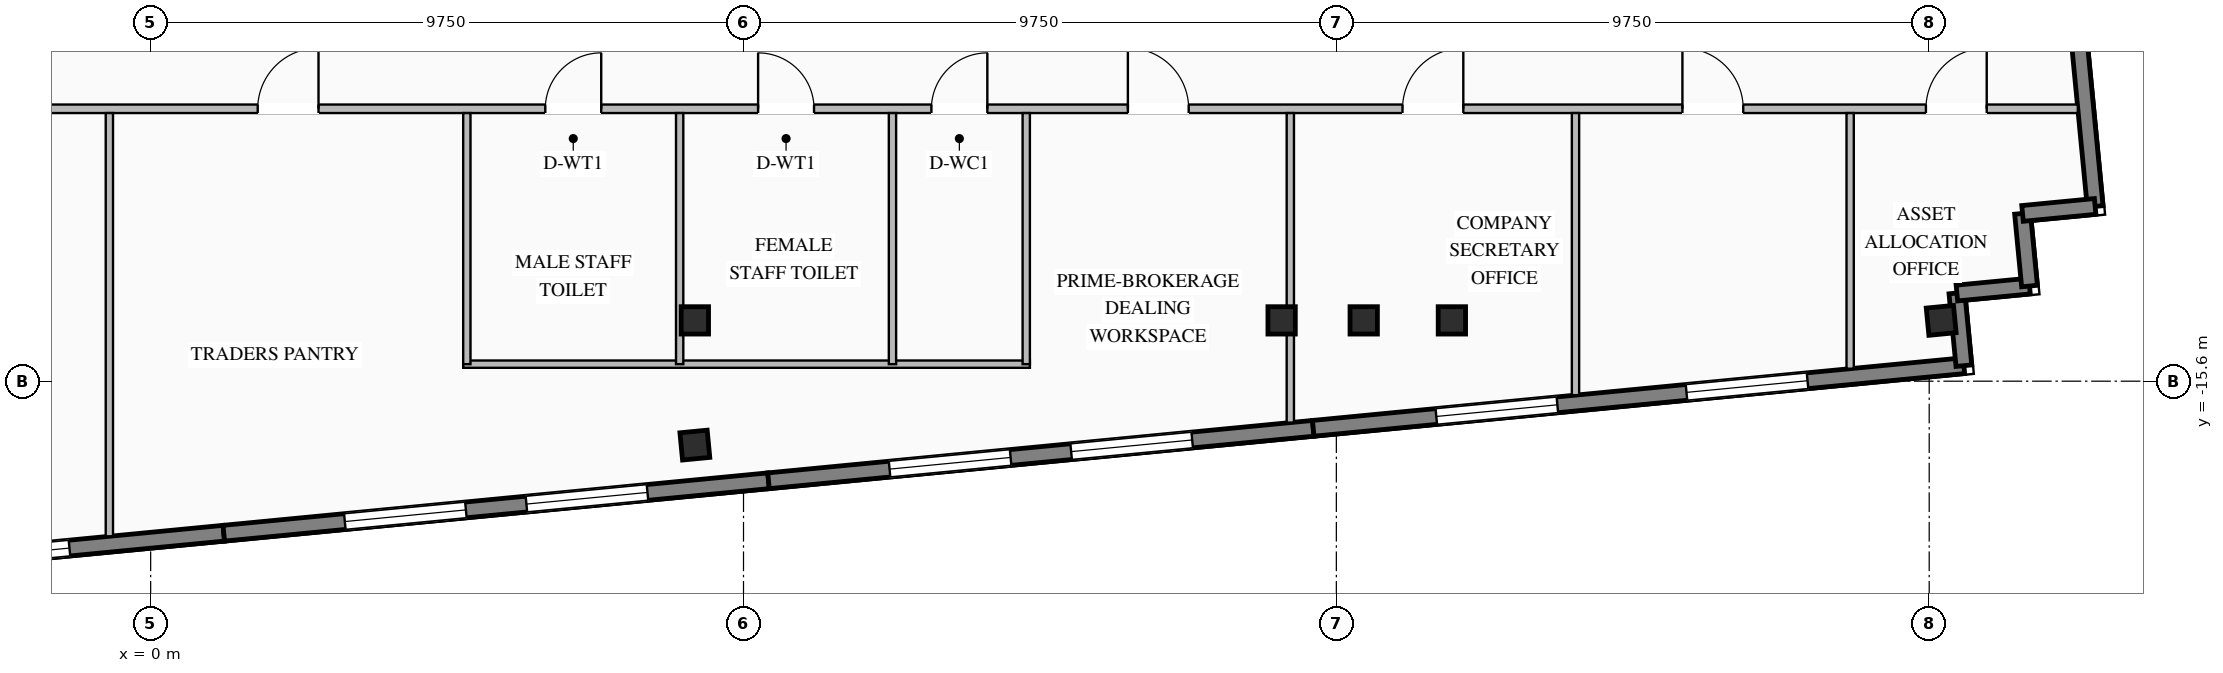
"""IFC4 building model, lengths in metres.
Left out: names, types, materials, properties, quantities, classifications, styles, units other than length and angle.
Written with IfcOpenShell. Run it as: python <this file> out.ifc"""

import sys

from ifc_helpers import new_model, si_unit, direction, frame, frame_2d, origin, origin_2d, place, context, subcontext, project, spatial, rectangle, i_section, extrude, element, fill, save


model = new_model("IFC4")
c1 = context("Model", 3, precision=1e-05, world=origin(), true_north=direction((0.0, 1.0)))
c2 = subcontext(c1, "Body", "Model", "MODEL_VIEW")
j1 = project(units=[si_unit("LENGTHUNIT", "METRE"), si_unit("PLANEANGLEUNIT", "RADIAN")], contexts=[c1])
p1 = place(None, origin())
s1 = spatial("IfcSite", under=j1, at=p1, CompositionType="ELEMENT")
p2 = place(p1, origin())
s2 = spatial("IfcBuilding", under=s1, at=p2, CompositionType="ELEMENT")
p3 = place(p2, frame((0.0, 0.0, 262.05)))
s3 = spatial("IfcBuildingStorey", under=s2, at=p3, CompositionType="ELEMENT", Elevation=262.05)
for number, where, z_axis, x_axis in (
    (1, (8.95, -14.6, 0.0), (0.0, 0.0, 1.0), (1.0, 0.0, 0.0)),
    (2, (18.6, -14.6, 0.0), (0.0, 0.0, 1.0), (1.0, 0.0, 0.0)),
    (3, (19.95, -14.6, 0.0), (0.0, 0.0, 1.0), (1.0, 0.0, 0.0)),
    (4, (21.4, -14.6, 0.0), (0.0, 0.0, 1.0), (1.0, 0.0, 0.0)),
    (5, (8.95, -16.651, 0.0), (0.0, 0.0, 1.0), (0.995, 0.096, 0.0)),
    (6, (29.447, -14.6, 0.0), (0.0, 0.0, 1.0), (0.995, 0.096, 0.0)),
):
    element("IfcColumn", number, at=place(p3, frame(where, z_axis=z_axis, x_axis=x_axis)), inside=s3, PredefinedType="COLUMN", context=c2, shape_type="SweptSolid", body=[
        extrude(i_section(OverallWidth=0.45, OverallDepth=0.45, WebThickness=0.022, FlangeThickness=0.032, at=origin_2d()), origin(), (0.0, 0.0, 1.0), 3.45),
    ])
p4 = place(p3, frame((1.203, -18.101, 0.0), z_axis=(0.0, 0.0, 1.0), x_axis=(-0.995397043619, -0.095836973841, 0.0)))
e7 = element("IfcWall", 7, at=p4, inside=s3, PredefinedType="STANDARD", context=c2, shape_type="SweptSolid", body=[
    extrude(rectangle(XDim=9.0, YDim=0.26, at=frame_2d((4.5, 0.0))), origin(), (0.0, 0.0, 1.0), 3.25),
])
p5 = place(p4, frame((2.55, 0.0, 0.76)))
e8 = element("IfcOpeningElement", 8, at=p5, cuts=e7, PredefinedType="OPENING", context=c2, shape_type="SweptSolid", body=[
    extrude(rectangle(XDim=2.0, YDim=2.05, at=frame_2d((1.0, 1.025))), frame((0.0, 0.14, 0.0), z_axis=(0.0, -1.0, 0.0), x_axis=(1.0, 0.0, 0.0)), (0.0, 0.0, 1.0), 0.28),
])
p6 = place(p4, frame((5.0, 0.0, 0.76)))
e9 = element("IfcOpeningElement", 9, at=p6, cuts=e7, PredefinedType="OPENING", context=c2, shape_type="SweptSolid", body=[
    extrude(rectangle(XDim=2.0, YDim=2.05, at=frame_2d((1.0, 1.025))), frame((0.0, 0.14, 0.0), z_axis=(0.0, -1.0, 0.0), x_axis=(1.0, 0.0, 0.0)), (0.0, 0.0, 1.0), 0.28),
])
p7 = place(p3, frame((10.161, -17.238, 0.0), z_axis=(0.0, 0.0, 1.0), x_axis=(-0.995394206237, -0.095866439332, 0.0)))
e10 = element("IfcWall", 10, at=p7, inside=s3, PredefinedType="STANDARD", context=c2, shape_type="SweptSolid", body=[
    extrude(rectangle(XDim=9.0, YDim=0.26, at=frame_2d((4.5, 0.0))), origin(), (0.0, 0.0, 1.0), 3.25),
])
p8 = place(p7, frame((2.0, 0.0, 0.76)))
e11 = element("IfcOpeningElement", 11, at=p8, cuts=e10, PredefinedType="OPENING", context=c2, shape_type="SweptSolid", body=[
    extrude(rectangle(XDim=2.0, YDim=2.05, at=frame_2d((1.0, 1.025))), frame((0.0, 0.14, 0.0), z_axis=(0.0, -1.0, 0.0), x_axis=(1.0, 0.0, 0.0)), (0.0, 0.0, 1.0), 0.28),
])
p9 = place(p7, frame((5.0, 0.0, 0.76)))
e12 = element("IfcOpeningElement", 12, at=p9, cuts=e10, PredefinedType="OPENING", context=c2, shape_type="SweptSolid", body=[
    extrude(rectangle(XDim=2.0, YDim=2.05, at=frame_2d((1.0, 1.025))), frame((0.0, 0.14, 0.0), z_axis=(0.0, -1.0, 0.0), x_axis=(1.0, 0.0, 0.0)), (0.0, 0.0, 1.0), 0.28),
])
p10 = place(p3, frame((19.12, -16.375, 0.0), z_axis=(0.0, 0.0, 1.0), x_axis=(-0.995396794462, -0.09583956164, 0.0)))
e13 = element("IfcWall", 13, at=p10, inside=s3, PredefinedType="STANDARD", context=c2, shape_type="SweptSolid", body=[
    extrude(rectangle(XDim=9.0, YDim=0.26, at=frame_2d((4.5, 0.0))), origin(), (0.0, 0.0, 1.0), 3.25),
])
p11 = place(p10, frame((2.0, 0.0, 0.76)))
e14 = element("IfcOpeningElement", 14, at=p11, cuts=e13, PredefinedType="OPENING", context=c2, shape_type="SweptSolid", body=[
    extrude(rectangle(XDim=2.0, YDim=2.05, at=frame_2d((1.0, 1.025))), frame((0.0, 0.14, 0.0), z_axis=(0.0, -1.0, 0.0), x_axis=(1.0, 0.0, 0.0)), (0.0, 0.0, 1.0), 0.28),
])
p12 = place(p10, frame((5.0, 0.0, 0.76)))
e15 = element("IfcOpeningElement", 15, at=p12, cuts=e13, PredefinedType="OPENING", context=c2, shape_type="SweptSolid", body=[
    extrude(rectangle(XDim=2.0, YDim=2.05, at=frame_2d((1.0, 1.025))), frame((0.0, 0.14, 0.0), z_axis=(0.0, -1.0, 0.0), x_axis=(1.0, 0.0, 0.0)), (0.0, 0.0, 1.0), 0.28),
])
p13 = place(p3, frame((29.821, -15.345, 0.0), z_axis=(0.0, 0.0, 1.0), x_axis=(-0.995396954468, -0.095837899791, 0.0)))
e16 = element("IfcWall", 16, at=p13, inside=s3, PredefinedType="STANDARD", context=c2, shape_type="SweptSolid", body=[
    extrude(rectangle(XDim=10.75, YDim=0.26, at=frame_2d((5.375, 0.0))), origin(), (0.0, 0.0, 1.0), 3.25),
])
p14 = place(p13, frame((2.583, 0.0, 0.76)))
e17 = element("IfcOpeningElement", 17, at=p14, cuts=e16, PredefinedType="OPENING", context=c2, shape_type="SweptSolid", body=[
    extrude(rectangle(XDim=2.0, YDim=2.05, at=frame_2d((1.0, 1.025))), frame((0.0, 0.14, 0.0), z_axis=(0.0, -1.0, 0.0), x_axis=(1.0, 0.0, 0.0)), (0.0, 0.0, 1.0), 0.28),
])
p15 = place(p13, frame((6.717, 0.0, 0.76)))
e18 = element("IfcOpeningElement", 18, at=p15, cuts=e16, PredefinedType="OPENING", context=c2, shape_type="SweptSolid", body=[
    extrude(rectangle(XDim=2.0, YDim=2.05, at=frame_2d((1.0, 1.025))), frame((0.0, 0.14, 0.0), z_axis=(0.0, -1.0, 0.0), x_axis=(1.0, 0.0, 0.0)), (0.0, 0.0, 1.0), 0.28),
])
p16 = place(p3, frame((30.527, 2.354, 0.0), z_axis=(0.0, 0.0, 1.0), x_axis=(0.095850890337, -0.995395703638, 0.0)))
e19 = element("IfcWall", 19, at=p16, inside=s3, PredefinedType="STANDARD", context=c2, shape_type="SweptSolid", body=[
    extrude(rectangle(XDim=15.15, YDim=0.26, at=frame_2d((7.575, 0.0))), origin(), (0.0, 0.0, 1.0), 3.25),
])
p17 = place(p16, frame((4.35, 0.0, 0.76)))
e20 = element("IfcOpeningElement", 20, at=p17, cuts=e19, PredefinedType="OPENING", context=c2, shape_type="SweptSolid", body=[
    extrude(rectangle(XDim=1.4, YDim=1.95, at=frame_2d((0.7, 0.975))), frame((0.0, 0.14, 0.0), z_axis=(0.0, -1.0, 0.0), x_axis=(1.0, 0.0, 0.0)), (0.0, 0.0, 1.0), 0.28),
])
p18 = place(p16, frame((9.4, 0.0, 0.76)))
e21 = element("IfcOpeningElement", 21, at=p18, cuts=e19, PredefinedType="OPENING", context=c2, shape_type="SweptSolid", body=[
    extrude(rectangle(XDim=1.4, YDim=1.95, at=frame_2d((0.7, 0.975))), frame((0.0, 0.14, 0.0), z_axis=(0.0, -1.0, 0.0), x_axis=(1.0, 0.0, 0.0)), (0.0, 0.0, 1.0), 0.28),
])
for number, where, z_axis, x_axis in (
    (22, (29.821, -15.345, 0.0), (0.0, 0.0, 1.0), (-0.096, 0.995, 0.0)),
    (23, (29.705, -14.15, 0.0), (0.0, 0.0, 1.0), (0.995, 0.096, 0.0)),
):
    element("IfcWall", number, at=place(p3, frame(where, z_axis=z_axis, x_axis=x_axis)), inside=s3, PredefinedType="STANDARD", context=c2, shape_type="SweptSolid", body=[
        extrude(rectangle(XDim=1.2, YDim=0.26, at=frame_2d((0.6, 0.0))), origin(), (0.0, 0.0, 1.0), 2.565),
    ])
p19 = place(p3, frame((30.9, -14.035, 0.0), z_axis=(0.0, 0.0, 1.0), x_axis=(-0.095836473879, 0.995397091755, 0.0)))
e24 = element("IfcWall", 24, at=p19, inside=s3, PredefinedType="STANDARD", context=c2, shape_type="SweptSolid", body=[
    extrude(rectangle(XDim=1.2, YDim=0.26, at=frame_2d((0.6, 0.0))), origin(), (0.0, 0.0, 1.0), 2.565),
])
p20 = place(p3, frame((30.785, -12.841, 0.0), z_axis=(0.0, 0.0, 1.0), x_axis=(0.995398960025, 0.095817067274, 0.0)))
e25 = element("IfcWall", 25, at=p20, inside=s3, PredefinedType="STANDARD", context=c2, shape_type="SweptSolid", body=[
    extrude(rectangle(XDim=1.2, YDim=0.26, at=frame_2d((0.6, 0.0))), origin(), (0.0, 0.0, 1.0), 2.565),
])
p21 = place(p3, frame((-21.591, -11.12, 0.0), z_axis=(0.0, 0.0, 1.0), x_axis=(1.0, 0.0, 0.0)))
e26 = element("IfcWall", 26, at=p21, inside=s3, PredefinedType="STANDARD", context=c2, shape_type="SweptSolid", body=[
    extrude(rectangle(XDim=53.285, YDim=0.14, at=frame_2d((26.643, 0.0))), origin(), (0.0, 0.0, 1.0), 3.25),
])
p22 = place(p21, frame((28.081, 0.0, 0.0)))
e27 = element("IfcOpeningElement", 27, at=p22, cuts=e26, PredefinedType="OPENING", context=c2, shape_type="SweptSolid", body=[
    extrude(rectangle(XDim=0.92, YDim=2.08, at=frame_2d((0.46, 1.04))), frame((0.0, 0.08, 0.0), z_axis=(0.0, -1.0, 0.0), x_axis=(1.0, 0.0, 0.0)), (0.0, 0.0, 1.0), 0.16),
])
p23 = place(p21, frame((31.581, 0.0, 0.0)))
e28 = element("IfcOpeningElement", 28, at=p23, cuts=e26, PredefinedType="OPENING", context=c2, shape_type="SweptSolid", body=[
    extrude(rectangle(XDim=0.92, YDim=2.08, at=frame_2d((0.46, 1.04))), frame((0.0, 0.08, 0.0), z_axis=(0.0, -1.0, 0.0), x_axis=(1.0, 0.0, 0.0)), (0.0, 0.0, 1.0), 0.16),
])
p24 = place(p21, frame((34.431, 0.0, 0.0)))
e29 = element("IfcOpeningElement", 29, at=p24, cuts=e26, PredefinedType="OPENING", context=c2, shape_type="SweptSolid", body=[
    extrude(rectangle(XDim=0.92, YDim=2.08, at=frame_2d((0.46, 1.04))), frame((0.0, 0.08, 0.0), z_axis=(0.0, -1.0, 0.0), x_axis=(1.0, 0.0, 0.0)), (0.0, 0.0, 1.0), 0.16),
])
p25 = place(p21, frame((3.0, 0.0, 0.0)))
e30 = element("IfcOpeningElement", 30, at=p25, cuts=e26, PredefinedType="OPENING", context=c2, shape_type="SweptSolid", body=[
    extrude(rectangle(XDim=1.0, YDim=2.08, at=frame_2d((0.5, 1.04))), frame((0.0, 0.08, 0.0), z_axis=(0.0, -1.0, 0.0), x_axis=(1.0, 0.0, 0.0)), (0.0, 0.0, 1.0), 0.16),
])
p26 = place(p21, frame((9.856, 0.0, 0.0)))
e31 = element("IfcOpeningElement", 31, at=p26, cuts=e26, PredefinedType="OPENING", context=c2, shape_type="SweptSolid", body=[
    extrude(rectangle(XDim=1.0, YDim=2.08, at=frame_2d((0.5, 1.04))), frame((0.0, 0.08, 0.0), z_axis=(0.0, -1.0, 0.0), x_axis=(1.0, 0.0, 0.0)), (0.0, 0.0, 1.0), 0.16),
])
p27 = place(p21, frame((16.938, 0.0, 0.0)))
e32 = element("IfcOpeningElement", 32, at=p27, cuts=e26, PredefinedType="OPENING", context=c2, shape_type="SweptSolid", body=[
    extrude(rectangle(XDim=1.0, YDim=2.08, at=frame_2d((0.5, 1.04))), frame((0.0, 0.08, 0.0), z_axis=(0.0, -1.0, 0.0), x_axis=(1.0, 0.0, 0.0)), (0.0, 0.0, 1.0), 0.16),
])
p28 = place(p21, frame((23.352, 0.0, 0.0)))
e33 = element("IfcOpeningElement", 33, at=p28, cuts=e26, PredefinedType="OPENING", context=c2, shape_type="SweptSolid", body=[
    extrude(rectangle(XDim=1.0, YDim=2.08, at=frame_2d((0.5, 1.04))), frame((0.0, 0.08, 0.0), z_axis=(0.0, -1.0, 0.0), x_axis=(1.0, 0.0, 0.0)), (0.0, 0.0, 1.0), 0.16),
])
p29 = place(p21, frame((37.663, 0.0, 0.0)))
e34 = element("IfcOpeningElement", 34, at=p29, cuts=e26, PredefinedType="OPENING", context=c2, shape_type="SweptSolid", body=[
    extrude(rectangle(XDim=1.0, YDim=2.08, at=frame_2d((0.5, 1.04))), frame((0.0, 0.08, 0.0), z_axis=(0.0, -1.0, 0.0), x_axis=(1.0, 0.0, 0.0)), (0.0, 0.0, 1.0), 0.16),
])
p30 = place(p21, frame((42.179, 0.0, 0.0)))
e35 = element("IfcOpeningElement", 35, at=p30, cuts=e26, PredefinedType="OPENING", context=c2, shape_type="SweptSolid", body=[
    extrude(rectangle(XDim=1.0, YDim=2.08, at=frame_2d((0.5, 1.04))), frame((0.0, 0.08, 0.0), z_axis=(0.0, -1.0, 0.0), x_axis=(1.0, 0.0, 0.0)), (0.0, 0.0, 1.0), 0.16),
])
p31 = place(p21, frame((46.783, 0.0, 0.0)))
e36 = element("IfcOpeningElement", 36, at=p31, cuts=e26, PredefinedType="OPENING", context=c2, shape_type="SweptSolid", body=[
    extrude(rectangle(XDim=1.0, YDim=2.08, at=frame_2d((0.5, 1.04))), frame((0.0, 0.08, 0.0), z_axis=(0.0, -1.0, 0.0), x_axis=(1.0, 0.0, 0.0)), (0.0, 0.0, 1.0), 0.16),
])
p32 = place(p21, frame((50.787, 0.0, 0.0)))
e37 = element("IfcOpeningElement", 37, at=p32, cuts=e26, PredefinedType="OPENING", context=c2, shape_type="SweptSolid", body=[
    extrude(rectangle(XDim=1.0, YDim=2.08, at=frame_2d((0.5, 1.04))), frame((0.0, 0.08, 0.0), z_axis=(0.0, -1.0, 0.0), x_axis=(1.0, 0.0, 0.0)), (0.0, 0.0, 1.0), 0.16),
])
p33 = place(p3, frame((5.14, -15.32, 0.0), z_axis=(0.0, 0.0, 1.0), x_axis=(1.0, 0.0, 0.0)))
e38 = element("IfcWall", 38, at=p33, inside=s3, PredefinedType="STANDARD", context=c2, shape_type="SweptSolid", body=[
    extrude(rectangle(XDim=9.32, YDim=0.12, at=frame_2d((4.66, 0.0))), origin(), (0.0, 0.0, 1.0), 3.25),
])
for number, where, z_axis, x_axis in (
    (39, (5.2, -15.32, 0.0), (0.0, 0.0, 1.0), (0.0, 1.0, 0.0)),
    (40, (8.7, -15.32, 0.0), (0.0, 0.0, 1.0), (0.0, 1.0, 0.0)),
    (41, (12.2, -15.32, 0.0), (0.0, 0.0, 1.0), (0.0, 1.0, 0.0)),
    (42, (14.4, -15.32, 0.0), (0.0, 0.0, 1.0), (0.0, 1.0, 0.0)),
):
    element("IfcWall", number, at=place(p3, frame(where, z_axis=z_axis, x_axis=x_axis)), inside=s3, PredefinedType="STANDARD", context=c2, shape_type="SweptSolid", body=[
        extrude(rectangle(XDim=4.13, YDim=0.12, at=frame_2d((2.065, 0.0))), origin(), (0.0, 0.0, 1.0), 3.25),
    ])
p34 = place(p3, frame((-0.679, -18.151, 0.0), z_axis=(0.0, 0.0, 1.0), x_axis=(0.0, 1.0, 0.0)))
e43 = element("IfcWall", 43, at=p34, inside=s3, PredefinedType="STANDARD", context=c2, shape_type="SweptSolid", body=[
    extrude(rectangle(XDim=6.961, YDim=0.12, at=frame_2d((3.48, 0.0))), origin(), (0.0, 0.0, 1.0), 3.25),
])
p35 = place(p3, frame((18.743, -16.281, 0.0), z_axis=(0.0, 0.0, 1.0), x_axis=(0.0, 1.0, 0.0)))
e44 = element("IfcWall", 44, at=p35, inside=s3, PredefinedType="STANDARD", context=c2, shape_type="SweptSolid", body=[
    extrude(rectangle(XDim=5.091, YDim=0.12, at=frame_2d((2.545, 0.0))), origin(), (0.0, 0.0, 1.0), 2.645),
])
p36 = place(p3, frame((23.433, -15.829, 0.0), z_axis=(0.0, 0.0, 1.0), x_axis=(0.0, 1.0, 0.0)))
e45 = element("IfcWall", 45, at=p36, inside=s3, PredefinedType="STANDARD", context=c2, shape_type="SweptSolid", body=[
    extrude(rectangle(XDim=4.639, YDim=0.12, at=frame_2d((2.32, 0.0))), origin(), (0.0, 0.0, 1.0), 3.25),
])
p37 = place(p3, frame((27.95, -15.394, 0.0), z_axis=(0.0, 0.0, 1.0), x_axis=(0.0, 1.0, 0.0)))
e46 = element("IfcWall", 46, at=p37, inside=s3, PredefinedType="STANDARD", context=c2, shape_type="SweptSolid", body=[
    extrude(rectangle(XDim=4.204, YDim=0.12, at=frame_2d((2.102, 0.0))), origin(), (0.0, 0.0, 1.0), 3.25),
])
p38 = place(p5, origin())
e47 = element("IfcWindow", 47, at=p38, inside=s3, PartitioningType="DOUBLE_PANEL_VERTICAL", PredefinedType="WINDOW", context=c2, shape_type="SweptSolid", body=[
    extrude(rectangle(XDim=2.0, YDim=2.05, at=frame_2d((1.0, 1.025))), frame((0.0, 0.03, 0.0), z_axis=(0.0, -1.0, 0.0), x_axis=(1.0, 0.0, 0.0)), (0.0, 0.0, 1.0), 0.06),
])
fill(e8, e47)
p39 = place(p8, origin())
e48 = element("IfcWindow", 48, at=p39, inside=s3, PartitioningType="DOUBLE_PANEL_VERTICAL", PredefinedType="WINDOW", context=c2, shape_type="SweptSolid", body=[
    extrude(rectangle(XDim=2.0, YDim=2.05, at=frame_2d((1.0, 1.025))), frame((0.0, 0.03, 0.0), z_axis=(0.0, -1.0, 0.0), x_axis=(1.0, 0.0, 0.0)), (0.0, 0.0, 1.0), 0.06),
])
fill(e11, e48)
p40 = place(p9, origin())
e49 = element("IfcWindow", 49, at=p40, inside=s3, PartitioningType="DOUBLE_PANEL_VERTICAL", PredefinedType="WINDOW", context=c2, shape_type="SweptSolid", body=[
    extrude(rectangle(XDim=2.0, YDim=2.05, at=frame_2d((1.0, 1.025))), frame((0.0, 0.03, 0.0), z_axis=(0.0, -1.0, 0.0), x_axis=(1.0, 0.0, 0.0)), (0.0, 0.0, 1.0), 0.06),
])
fill(e12, e49)
p41 = place(p11, origin())
e50 = element("IfcWindow", 50, at=p41, inside=s3, PartitioningType="DOUBLE_PANEL_VERTICAL", PredefinedType="WINDOW", context=c2, shape_type="SweptSolid", body=[
    extrude(rectangle(XDim=2.0, YDim=2.05, at=frame_2d((1.0, 1.025))), frame((0.0, 0.03, 0.0), z_axis=(0.0, -1.0, 0.0), x_axis=(1.0, 0.0, 0.0)), (0.0, 0.0, 1.0), 0.06),
])
fill(e14, e50)
p42 = place(p12, origin())
e51 = element("IfcWindow", 51, at=p42, inside=s3, PartitioningType="DOUBLE_PANEL_VERTICAL", PredefinedType="WINDOW", context=c2, shape_type="SweptSolid", body=[
    extrude(rectangle(XDim=2.0, YDim=2.05, at=frame_2d((1.0, 1.025))), frame((0.0, 0.03, 0.0), z_axis=(0.0, -1.0, 0.0), x_axis=(1.0, 0.0, 0.0)), (0.0, 0.0, 1.0), 0.06),
])
fill(e15, e51)
p43 = place(p14, origin())
e52 = element("IfcWindow", 52, at=p43, inside=s3, PartitioningType="DOUBLE_PANEL_VERTICAL", PredefinedType="WINDOW", context=c2, shape_type="SweptSolid", body=[
    extrude(rectangle(XDim=2.0, YDim=2.05, at=frame_2d((1.0, 1.025))), frame((0.0, 0.03, 0.0), z_axis=(0.0, -1.0, 0.0), x_axis=(1.0, 0.0, 0.0)), (0.0, 0.0, 1.0), 0.06),
])
fill(e17, e52)
p44 = place(p15, origin())
e53 = element("IfcWindow", 53, at=p44, inside=s3, PartitioningType="DOUBLE_PANEL_VERTICAL", PredefinedType="WINDOW", context=c2, shape_type="SweptSolid", body=[
    extrude(rectangle(XDim=2.0, YDim=2.05, at=frame_2d((1.0, 1.025))), frame((0.0, 0.03, 0.0), z_axis=(0.0, -1.0, 0.0), x_axis=(1.0, 0.0, 0.0)), (0.0, 0.0, 1.0), 0.06),
])
fill(e18, e53)
p45 = place(p22, origin())
e54 = element("IfcDoor", 54, at=p45, inside=s3, OperationType="SINGLE_SWING_RIGHT", PredefinedType="DOOR", context=c2, shape_type="SweptSolid", body=[
    extrude(rectangle(XDim=0.92, YDim=2.08, at=frame_2d((0.46, 1.04))), frame((0.0, 0.025, 0.0), z_axis=(0.0, -1.0, 0.0), x_axis=(1.0, 0.0, 0.0)), (0.0, 0.0, 1.0), 0.05),
])
fill(e27, e54)
p46 = place(p23, origin())
e55 = element("IfcDoor", 55, at=p46, inside=s3, OperationType="SINGLE_SWING_LEFT", PredefinedType="DOOR", context=c2, shape_type="SweptSolid", body=[
    extrude(rectangle(XDim=0.92, YDim=2.08, at=frame_2d((0.46, 1.04))), frame((0.0, 0.025, 0.0), z_axis=(0.0, -1.0, 0.0), x_axis=(1.0, 0.0, 0.0)), (0.0, 0.0, 1.0), 0.05),
])
fill(e28, e55)
p47 = place(p24, origin())
e56 = element("IfcDoor", 56, at=p47, inside=s3, OperationType="SINGLE_SWING_RIGHT", PredefinedType="DOOR", context=c2, shape_type="SweptSolid", body=[
    extrude(rectangle(XDim=0.92, YDim=2.08, at=frame_2d((0.46, 1.04))), frame((0.0, 0.025, 0.0), z_axis=(0.0, -1.0, 0.0), x_axis=(1.0, 0.0, 0.0)), (0.0, 0.0, 1.0), 0.05),
])
fill(e29, e56)
p48 = place(p28, origin())
e57 = element("IfcDoor", 57, at=p48, inside=s3, OperationType="SINGLE_SWING_RIGHT", PredefinedType="DOOR", context=c2, shape_type="SweptSolid", body=[
    extrude(rectangle(XDim=1.0, YDim=2.08, at=frame_2d((0.5, 1.04))), frame((0.0, 0.025, 0.0), z_axis=(0.0, -1.0, 0.0), x_axis=(1.0, 0.0, 0.0)), (0.0, 0.0, 1.0), 0.05),
])
fill(e33, e57)
p49 = place(p29, origin())
e58 = element("IfcDoor", 58, at=p49, inside=s3, OperationType="SINGLE_SWING_LEFT", PredefinedType="DOOR", context=c2, shape_type="SweptSolid", body=[
    extrude(rectangle(XDim=1.0, YDim=2.08, at=frame_2d((0.5, 1.04))), frame((0.0, 0.025, 0.0), z_axis=(0.0, -1.0, 0.0), x_axis=(1.0, 0.0, 0.0)), (0.0, 0.0, 1.0), 0.05),
])
fill(e34, e58)
p50 = place(p30, origin())
e59 = element("IfcDoor", 59, at=p50, inside=s3, OperationType="SINGLE_SWING_RIGHT", PredefinedType="DOOR", context=c2, shape_type="SweptSolid", body=[
    extrude(rectangle(XDim=1.0, YDim=2.08, at=frame_2d((0.5, 1.04))), frame((0.0, 0.025, 0.0), z_axis=(0.0, -1.0, 0.0), x_axis=(1.0, 0.0, 0.0)), (0.0, 0.0, 1.0), 0.05),
])
fill(e35, e59)
p51 = place(p31, origin())
e60 = element("IfcDoor", 60, at=p51, inside=s3, OperationType="SINGLE_SWING_LEFT", PredefinedType="DOOR", context=c2, shape_type="SweptSolid", body=[
    extrude(rectangle(XDim=1.0, YDim=2.08, at=frame_2d((0.5, 1.04))), frame((0.0, 0.025, 0.0), z_axis=(0.0, -1.0, 0.0), x_axis=(1.0, 0.0, 0.0)), (0.0, 0.0, 1.0), 0.05),
])
fill(e36, e60)
p52 = place(p32, origin())
e61 = element("IfcDoor", 61, at=p52, inside=s3, OperationType="SINGLE_SWING_RIGHT", PredefinedType="DOOR", context=c2, shape_type="SweptSolid", body=[
    extrude(rectangle(XDim=1.0, YDim=2.08, at=frame_2d((0.5, 1.04))), frame((0.0, 0.025, 0.0), z_axis=(0.0, -1.0, 0.0), x_axis=(1.0, 0.0, 0.0)), (0.0, 0.0, 1.0), 0.05),
])
fill(e37, e61)
save(model, sys.argv[1])
